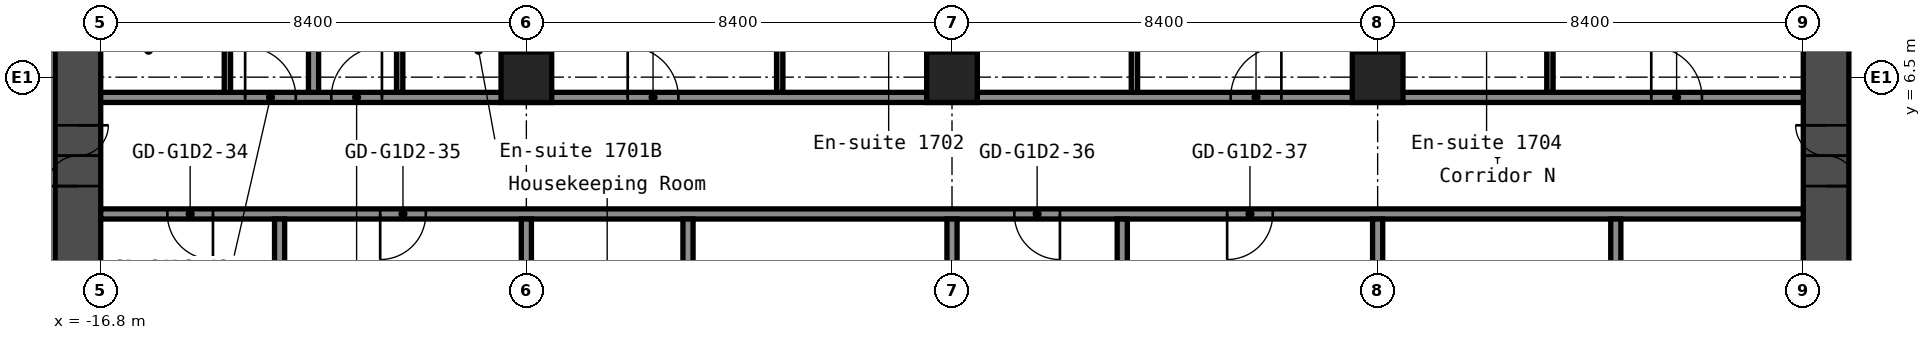
"""IFC4 building model, lengths in metres.
Left out: names, types, materials, properties, quantities, classifications, styles, units other than length and angle.
Written with IfcOpenShell. Run it as: python <this file> out.ifc"""

import sys

from ifc_helpers import new_model, si_unit, direction, frame, frame_2d, origin, origin_2d, place, context, subcontext, project, spatial, rectangle, hollow_rectangle, extrude, element, fill, save


model = new_model("IFC4")
c1 = context("Model", 3, precision=1e-05, world=origin(), true_north=direction((0.0, 1.0)))
c2 = subcontext(c1, "Body", "Model", "MODEL_VIEW")
j1 = project(units=[si_unit("LENGTHUNIT", "METRE"), si_unit("PLANEANGLEUNIT", "RADIAN")], contexts=[c1])
p1 = place(None, origin())
s1 = spatial("IfcSite", under=j1, at=p1, CompositionType="ELEMENT")
p2 = place(p1, origin())
s2 = spatial("IfcBuilding", under=s1, at=p2, CompositionType="ELEMENT")
p3 = place(p2, frame((0.0, 0.0, 61.4)))
s3 = spatial("IfcBuildingStorey", under=s2, at=p3, CompositionType="ELEMENT", Elevation=61.4)
for number, where, z_axis, x_axis in (
    (1, (-8.4, 6.5, 0.0), (0.0, 0.0, 1.0), (1.0, 0.0, 0.0)),
    (2, (0.0, 6.5, 0.0), (0.0, 0.0, 1.0), (1.0, 0.0, 0.0)),
    (3, (8.4, 6.5, 0.0), (0.0, 0.0, 1.0), (1.0, 0.0, 0.0)),
):
    element("IfcColumn", number, at=place(p3, frame(where, z_axis=z_axis, x_axis=x_axis)), inside=s3, PredefinedType="COLUMN", context=c2, shape_type="SweptSolid", body=[
        extrude(hollow_rectangle(XDim=1.0, YDim=1.0, WallThickness=0.04, at=origin_2d()), origin(), (0.0, 0.0, 1.0), 2.9),
    ])
p4 = place(p3, frame((-17.25, -8.4, 0.0), z_axis=(0.0, 0.0, 1.0), x_axis=(0.0, 1.0, 0.0)))
e4 = element("IfcWall", 4, at=p4, inside=s3, PredefinedType="SHEAR", context=c2, shape_type="SweptSolid", body=[
    extrude(rectangle(XDim=16.8, YDim=0.9, at=frame_2d((8.4, 0.0))), origin(), (0.0, 0.0, 1.0), 2.9),
])
p5 = place(p4, frame((12.75, 0.0, 0.0)))
e5 = element("IfcOpeningElement", 5, at=p5, cuts=e4, PredefinedType="OPENING", context=c2, shape_type="SweptSolid", body=[
    extrude(rectangle(XDim=1.2, YDim=2.1, at=frame_2d((0.6, 1.05))), frame((0.0, 0.46, 0.0), z_axis=(0.0, -1.0, 0.0), x_axis=(1.0, 0.0, 0.0)), (0.0, 0.0, 1.0), 0.92),
])
p6 = place(p4, frame((2.85, 0.0, 0.0)))
e6 = element("IfcOpeningElement", 6, at=p6, cuts=e4, PredefinedType="OPENING", context=c2, shape_type="SweptSolid", body=[
    extrude(rectangle(XDim=1.2, YDim=2.1, at=frame_2d((0.6, 1.05))), frame((0.0, 0.46, 0.0), z_axis=(0.0, -1.0, 0.0), x_axis=(1.0, 0.0, 0.0)), (0.0, 0.0, 1.0), 0.92),
])
p7 = place(p3, frame((17.25, -8.4, 0.0), z_axis=(0.0, 0.0, 1.0), x_axis=(0.0, 1.0, 0.0)))
e7 = element("IfcWall", 7, at=p7, inside=s3, PredefinedType="SHEAR", context=c2, shape_type="SweptSolid", body=[
    extrude(rectangle(XDim=16.8, YDim=0.9, at=frame_2d((8.4, 0.0))), origin(), (0.0, 0.0, 1.0), 2.9),
])
p8 = place(p7, frame((12.75, 0.0, 0.0)))
e8 = element("IfcOpeningElement", 8, at=p8, cuts=e7, PredefinedType="OPENING", context=c2, shape_type="SweptSolid", body=[
    extrude(rectangle(XDim=1.2, YDim=2.1, at=frame_2d((0.6, 1.05))), frame((0.0, 0.46, 0.0), z_axis=(0.0, -1.0, 0.0), x_axis=(1.0, 0.0, 0.0)), (0.0, 0.0, 1.0), 0.92),
])
p9 = place(p7, frame((2.85, 0.0, 0.0)))
e9 = element("IfcOpeningElement", 9, at=p9, cuts=e7, PredefinedType="OPENING", context=c2, shape_type="SweptSolid", body=[
    extrude(rectangle(XDim=1.2, YDim=2.1, at=frame_2d((0.6, 1.05))), frame((0.0, 0.46, 0.0), z_axis=(0.0, -1.0, 0.0), x_axis=(1.0, 0.0, 0.0)), (0.0, 0.0, 1.0), 0.92),
])
p10 = place(p3, frame((-16.8, 3.8, 0.0), z_axis=(0.0, 0.0, 1.0), x_axis=(1.0, 0.0, 0.0)))
e10 = element("IfcWall", 10, at=p10, inside=s3, PredefinedType="PARTITIONING", context=c2, shape_type="SweptSolid", body=[
    extrude(rectangle(XDim=33.6, YDim=0.2, at=frame_2d((16.8, 0.0))), origin(), (0.0, 0.0, 1.0), 2.9),
])
p11 = place(p10, frame((1.315, 0.0, 0.0)))
e11 = element("IfcOpeningElement", 11, at=p11, cuts=e10, PredefinedType="OPENING", context=c2, shape_type="SweptSolid", body=[
    extrude(rectangle(XDim=0.9, YDim=2.1, at=frame_2d((0.45, 1.05))), frame((0.0, 0.11, 0.0), z_axis=(0.0, -1.0, 0.0), x_axis=(1.0, 0.0, 0.0)), (0.0, 0.0, 1.0), 0.22),
])
p12 = place(p10, frame((5.515, 0.0, 0.0)))
e12 = element("IfcOpeningElement", 12, at=p12, cuts=e10, PredefinedType="OPENING", context=c2, shape_type="SweptSolid", body=[
    extrude(rectangle(XDim=0.9, YDim=2.1, at=frame_2d((0.45, 1.05))), frame((0.0, 0.11, 0.0), z_axis=(0.0, -1.0, 0.0), x_axis=(1.0, 0.0, 0.0)), (0.0, 0.0, 1.0), 0.22),
])
p13 = place(p10, frame((18.03, 0.0, 0.0)))
e13 = element("IfcOpeningElement", 13, at=p13, cuts=e10, PredefinedType="OPENING", context=c2, shape_type="SweptSolid", body=[
    extrude(rectangle(XDim=0.9, YDim=2.1, at=frame_2d((0.45, 1.05))), frame((0.0, 0.11, 0.0), z_axis=(0.0, -1.0, 0.0), x_axis=(1.0, 0.0, 0.0)), (0.0, 0.0, 1.0), 0.22),
])
p14 = place(p10, frame((22.23, 0.0, 0.0)))
e14 = element("IfcOpeningElement", 14, at=p14, cuts=e10, PredefinedType="OPENING", context=c2, shape_type="SweptSolid", body=[
    extrude(rectangle(XDim=0.9, YDim=2.1, at=frame_2d((0.45, 1.05))), frame((0.0, 0.11, 0.0), z_axis=(0.0, -1.0, 0.0), x_axis=(1.0, 0.0, 0.0)), (0.0, 0.0, 1.0), 0.22),
])
p15 = place(p3, frame((-16.8, 6.1, 0.0), z_axis=(0.0, 0.0, 1.0), x_axis=(1.0, 0.0, 0.0)))
e15 = element("IfcWall", 15, at=p15, inside=s3, PredefinedType="PARTITIONING", context=c2, shape_type="SweptSolid", body=[
    extrude(rectangle(XDim=33.6, YDim=0.2, at=frame_2d((16.8, 0.0))), origin(), (0.0, 0.0, 1.0), 2.9),
])
p16 = place(p15, frame((2.85, 0.0, 0.0)))
e16 = element("IfcOpeningElement", 16, at=p16, cuts=e15, PredefinedType="OPENING", context=c2, shape_type="SweptSolid", body=[
    extrude(rectangle(XDim=1.0, YDim=2.1, at=frame_2d((0.5, 1.05))), frame((0.0, 0.11, 0.0), z_axis=(0.0, -1.0, 0.0), x_axis=(1.0, 0.0, 0.0)), (0.0, 0.0, 1.0), 0.22),
])
p17 = place(p15, frame((4.55, 0.0, 0.0)))
e17 = element("IfcOpeningElement", 17, at=p17, cuts=e15, PredefinedType="OPENING", context=c2, shape_type="SweptSolid", body=[
    extrude(rectangle(XDim=1.0, YDim=2.1, at=frame_2d((0.5, 1.05))), frame((0.0, 0.11, 0.0), z_axis=(0.0, -1.0, 0.0), x_axis=(1.0, 0.0, 0.0)), (0.0, 0.0, 1.0), 0.22),
])
p18 = place(p15, frame((10.4, 0.0, 0.0)))
e18 = element("IfcOpeningElement", 18, at=p18, cuts=e15, PredefinedType="OPENING", context=c2, shape_type="SweptSolid", body=[
    extrude(rectangle(XDim=1.0, YDim=2.1, at=frame_2d((0.5, 1.05))), frame((0.0, 0.11, 0.0), z_axis=(0.0, -1.0, 0.0), x_axis=(1.0, 0.0, 0.0)), (0.0, 0.0, 1.0), 0.22),
])
p19 = place(p15, frame((22.3, 0.0, 0.0)))
e19 = element("IfcOpeningElement", 19, at=p19, cuts=e15, PredefinedType="OPENING", context=c2, shape_type="SweptSolid", body=[
    extrude(rectangle(XDim=1.0, YDim=2.1, at=frame_2d((0.5, 1.05))), frame((0.0, 0.11, 0.0), z_axis=(0.0, -1.0, 0.0), x_axis=(1.0, 0.0, 0.0)), (0.0, 0.0, 1.0), 0.22),
])
p20 = place(p15, frame((30.6, 0.0, 0.0)))
e20 = element("IfcOpeningElement", 20, at=p20, cuts=e15, PredefinedType="OPENING", context=c2, shape_type="SweptSolid", body=[
    extrude(rectangle(XDim=1.0, YDim=2.1, at=frame_2d((0.5, 1.05))), frame((0.0, 0.11, 0.0), z_axis=(0.0, -1.0, 0.0), x_axis=(1.0, 0.0, 0.0)), (0.0, 0.0, 1.0), 0.22),
])
p21 = place(p3, frame((-14.3, 6.2, 0.0), z_axis=(0.0, 0.0, 1.0), x_axis=(0.0, 1.0, 0.0)))
e21 = element("IfcWall", 21, at=p21, inside=s3, PredefinedType="PARTITIONING", context=c2, shape_type="SweptSolid", body=[
    extrude(rectangle(XDim=2.9, YDim=0.125, at=frame_2d((1.45, 0.0))), origin(), (0.0, 0.0, 1.0), 2.9),
])
p22 = place(p21, frame((1.5, 0.0, 0.0)))
e22 = element("IfcOpeningElement", 22, at=p22, cuts=e21, PredefinedType="OPENING", context=c2, shape_type="SweptSolid", body=[
    extrude(rectangle(XDim=0.8, YDim=2.1, at=frame_2d((0.4, 1.05))), frame((0.0, 0.073, 0.0), z_axis=(0.0, -1.0, 0.0), x_axis=(1.0, 0.0, 0.0)), (0.0, 0.0, 1.0), 0.145),
])
p23 = place(p3, frame((-13.27, -3.7, 0.0), z_axis=(0.0, 0.0, 1.0), x_axis=(0.0, 1.0, 0.0)))
e23 = element("IfcWall", 23, at=p23, inside=s3, PredefinedType="PARTITIONING", context=c2, shape_type="SweptSolid", body=[
    extrude(rectangle(XDim=7.4, YDim=0.2, at=frame_2d((3.7, 0.0))), origin(), (0.0, 0.0, 1.0), 2.9),
])
p24 = place(p3, frame((-12.6, 6.2, 0.0), z_axis=(0.0, 0.0, 1.0), x_axis=(0.0, 1.0, 0.0)))
e24 = element("IfcWall", 24, at=p24, inside=s3, PredefinedType="PARTITIONING", context=c2, shape_type="SweptSolid", body=[
    extrude(rectangle(XDim=14.1, YDim=0.2, at=frame_2d((7.05, 0.0))), origin(), (0.0, 0.0, 1.0), 2.9),
])
p25 = place(p3, frame((-10.9, 6.2, 0.0), z_axis=(0.0, 0.0, 1.0), x_axis=(0.0, 1.0, 0.0)))
e25 = element("IfcWall", 25, at=p25, inside=s3, PredefinedType="PARTITIONING", context=c2, shape_type="SweptSolid", body=[
    extrude(rectangle(XDim=2.9, YDim=0.125, at=frame_2d((1.45, 0.0))), origin(), (0.0, 0.0, 1.0), 2.9),
])
p26 = place(p25, frame((1.5, 0.0, 0.0)))
e26 = element("IfcOpeningElement", 26, at=p26, cuts=e25, PredefinedType="OPENING", context=c2, shape_type="SweptSolid", body=[
    extrude(rectangle(XDim=0.8, YDim=2.1, at=frame_2d((0.4, 1.05))), frame((0.0, 0.073, 0.0), z_axis=(0.0, -1.0, 0.0), x_axis=(1.0, 0.0, 0.0)), (0.0, 0.0, 1.0), 0.145),
])
p27 = place(p3, frame((-8.4, -3.7, 0.0), z_axis=(0.0, 0.0, 1.0), x_axis=(0.0, 1.0, 0.0)))
e27 = element("IfcWall", 27, at=p27, inside=s3, PredefinedType="PARTITIONING", context=c2, shape_type="SweptSolid", body=[
    extrude(rectangle(XDim=7.4, YDim=0.2, at=frame_2d((3.7, 0.0))), origin(), (0.0, 0.0, 1.0), 2.9),
])
p28 = place(p3, frame((-8.4, 6.99, 0.0), z_axis=(0.0, 0.0, 1.0), x_axis=(0.0, 1.0, 0.0)))
e28 = element("IfcWall", 28, at=p28, inside=s3, PredefinedType="PARTITIONING", context=c2, shape_type="SweptSolid", body=[
    extrude(rectangle(XDim=13.31, YDim=0.2, at=frame_2d((6.655, 0.0))), origin(), (0.0, 0.0, 1.0), 2.9),
])
p29 = place(p3, frame((-5.21, -3.7, 0.0), z_axis=(0.0, 0.0, 1.0), x_axis=(0.0, 1.0, 0.0)))
e29 = element("IfcWall", 29, at=p29, inside=s3, PredefinedType="PARTITIONING", context=c2, shape_type="SweptSolid", body=[
    extrude(rectangle(XDim=7.4, YDim=0.2, at=frame_2d((3.7, 0.0))), origin(), (0.0, 0.0, 1.0), 2.9),
])
p30 = place(p3, frame((-3.4, 6.2, 0.0), z_axis=(0.0, 0.0, 1.0), x_axis=(0.0, 1.0, 0.0)))
e30 = element("IfcWall", 30, at=p30, inside=s3, PredefinedType="PARTITIONING", context=c2, shape_type="SweptSolid", body=[
    extrude(rectangle(XDim=3.3, YDim=0.125, at=frame_2d((1.65, 0.0))), origin(), (0.0, 0.0, 1.0), 2.9),
])
p31 = place(p3, frame((0.0, -3.7, 0.0), z_axis=(0.0, 0.0, 1.0), x_axis=(0.0, 1.0, 0.0)))
e31 = element("IfcWall", 31, at=p31, inside=s3, PredefinedType="PARTITIONING", context=c2, shape_type="SweptSolid", body=[
    extrude(rectangle(XDim=7.4, YDim=0.2, at=frame_2d((3.7, 0.0))), origin(), (0.0, 0.0, 1.0), 2.9),
])
p32 = place(p3, frame((0.0, 6.99, 0.0), z_axis=(0.0, 0.0, 1.0), x_axis=(0.0, 1.0, 0.0)))
e32 = element("IfcWall", 32, at=p32, inside=s3, PredefinedType="PARTITIONING", context=c2, shape_type="SweptSolid", body=[
    extrude(rectangle(XDim=13.31, YDim=0.2, at=frame_2d((6.655, 0.0))), origin(), (0.0, 0.0, 1.0), 2.9),
])
p33 = place(p3, frame((3.36, -3.7, 0.0), z_axis=(0.0, 0.0, 1.0), x_axis=(0.0, 1.0, 0.0)))
e33 = element("IfcWall", 33, at=p33, inside=s3, PredefinedType="PARTITIONING", context=c2, shape_type="SweptSolid", body=[
    extrude(rectangle(XDim=7.4, YDim=0.2, at=frame_2d((3.7, 0.0))), origin(), (0.0, 0.0, 1.0), 2.9),
])
p34 = place(p3, frame((3.6, 6.2, 0.0), z_axis=(0.0, 0.0, 1.0), x_axis=(0.0, 1.0, 0.0)))
e34 = element("IfcWall", 34, at=p34, inside=s3, PredefinedType="PARTITIONING", context=c2, shape_type="SweptSolid", body=[
    extrude(rectangle(XDim=3.3, YDim=0.125, at=frame_2d((1.65, 0.0))), origin(), (0.0, 0.0, 1.0), 2.9),
])
p35 = place(p34, frame((1.1, 0.0, 0.0)))
e35 = element("IfcOpeningElement", 35, at=p35, cuts=e34, PredefinedType="OPENING", context=c2, shape_type="SweptSolid", body=[
    extrude(rectangle(XDim=1.0, YDim=2.1, at=frame_2d((0.5, 1.05))), frame((0.0, 0.073, 0.0), z_axis=(0.0, -1.0, 0.0), x_axis=(1.0, 0.0, 0.0)), (0.0, 0.0, 1.0), 0.145),
])
p36 = place(p3, frame((8.4, -3.7, 0.0), z_axis=(0.0, 0.0, 1.0), x_axis=(0.0, 1.0, 0.0)))
e36 = element("IfcWall", 36, at=p36, inside=s3, PredefinedType="PARTITIONING", context=c2, shape_type="SweptSolid", body=[
    extrude(rectangle(XDim=7.4, YDim=0.2, at=frame_2d((3.7, 0.0))), origin(), (0.0, 0.0, 1.0), 2.9),
])
p37 = place(p3, frame((8.4, 6.99, 0.0), z_axis=(0.0, 0.0, 1.0), x_axis=(0.0, 1.0, 0.0)))
e37 = element("IfcWall", 37, at=p37, inside=s3, PredefinedType="PARTITIONING", context=c2, shape_type="SweptSolid", body=[
    extrude(rectangle(XDim=13.31, YDim=0.2, at=frame_2d((6.655, 0.0))), origin(), (0.0, 0.0, 1.0), 2.9),
])
p38 = place(p3, frame((11.8, 6.2, 0.0), z_axis=(0.0, 0.0, 1.0), x_axis=(0.0, 1.0, 0.0)))
e38 = element("IfcWall", 38, at=p38, inside=s3, PredefinedType="PARTITIONING", context=c2, shape_type="SweptSolid", body=[
    extrude(rectangle(XDim=3.3, YDim=0.125, at=frame_2d((1.65, 0.0))), origin(), (0.0, 0.0, 1.0), 2.9),
])
p39 = place(p3, frame((13.1, -3.7, 0.0), z_axis=(0.0, 0.0, 1.0), x_axis=(0.0, 1.0, 0.0)))
e39 = element("IfcWall", 39, at=p39, inside=s3, PredefinedType="PARTITIONING", context=c2, shape_type="SweptSolid", body=[
    extrude(rectangle(XDim=7.4, YDim=0.2, at=frame_2d((3.7, 0.0))), origin(), (0.0, 0.0, 1.0), 2.9),
])
p40 = place(p5, origin())
e40 = element("IfcDoor", 40, at=p40, inside=s3, OperationType="DOUBLE_DOOR_SINGLE_SWING", PredefinedType="DOOR", context=c2, shape_type="SweptSolid", body=[
    extrude(rectangle(XDim=1.2, YDim=2.1, at=frame_2d((0.6, 1.05))), frame((0.0, 0.025, 0.0), z_axis=(0.0, -1.0, 0.0), x_axis=(1.0, 0.0, 0.0)), (0.0, 0.0, 1.0), 0.05),
])
fill(e5, e40)
p41 = place(p8, origin())
e41 = element("IfcDoor", 41, at=p41, inside=s3, OperationType="DOUBLE_DOOR_SINGLE_SWING", PredefinedType="DOOR", context=c2, shape_type="SweptSolid", body=[
    extrude(rectangle(XDim=1.2, YDim=2.1, at=frame_2d((0.6, 1.05))), frame((0.0, 0.025, 0.0), z_axis=(0.0, -1.0, 0.0), x_axis=(1.0, 0.0, 0.0)), (0.0, 0.0, 1.0), 0.05),
])
fill(e8, e41)
p42 = place(p11, origin())
e42 = element("IfcDoor", 42, at=p42, inside=s3, OperationType="SINGLE_SWING_RIGHT", PredefinedType="DOOR", context=c2, shape_type="SweptSolid", body=[
    extrude(rectangle(XDim=0.9, YDim=2.1, at=frame_2d((0.45, 1.05))), frame((0.0, 0.025, 0.0), z_axis=(0.0, -1.0, 0.0), x_axis=(1.0, 0.0, 0.0)), (0.0, 0.0, 1.0), 0.05),
])
fill(e11, e42)
p43 = place(p12, origin())
e43 = element("IfcDoor", 43, at=p43, inside=s3, OperationType="SINGLE_SWING_LEFT", PredefinedType="DOOR", context=c2, shape_type="SweptSolid", body=[
    extrude(rectangle(XDim=0.9, YDim=2.1, at=frame_2d((0.45, 1.05))), frame((0.0, 0.025, 0.0), z_axis=(0.0, -1.0, 0.0), x_axis=(1.0, 0.0, 0.0)), (0.0, 0.0, 1.0), 0.05),
])
fill(e12, e43)
p44 = place(p13, origin())
e44 = element("IfcDoor", 44, at=p44, inside=s3, OperationType="SINGLE_SWING_RIGHT", PredefinedType="DOOR", context=c2, shape_type="SweptSolid", body=[
    extrude(rectangle(XDim=0.9, YDim=2.1, at=frame_2d((0.45, 1.05))), frame((0.0, 0.025, 0.0), z_axis=(0.0, -1.0, 0.0), x_axis=(1.0, 0.0, 0.0)), (0.0, 0.0, 1.0), 0.05),
])
fill(e13, e44)
p45 = place(p14, origin())
e45 = element("IfcDoor", 45, at=p45, inside=s3, OperationType="SINGLE_SWING_LEFT", PredefinedType="DOOR", context=c2, shape_type="SweptSolid", body=[
    extrude(rectangle(XDim=0.9, YDim=2.1, at=frame_2d((0.45, 1.05))), frame((0.0, 0.025, 0.0), z_axis=(0.0, -1.0, 0.0), x_axis=(1.0, 0.0, 0.0)), (0.0, 0.0, 1.0), 0.05),
])
fill(e14, e45)
p46 = place(p16, origin())
e46 = element("IfcDoor", 46, at=p46, inside=s3, OperationType="SINGLE_SWING_RIGHT", PredefinedType="DOOR", context=c2, shape_type="SweptSolid", body=[
    extrude(rectangle(XDim=1.0, YDim=2.1, at=frame_2d((0.5, 1.05))), frame((0.0, 0.025, 0.0), z_axis=(0.0, -1.0, 0.0), x_axis=(1.0, 0.0, 0.0)), (0.0, 0.0, 1.0), 0.05),
])
fill(e16, e46)
p47 = place(p17, origin())
e47 = element("IfcDoor", 47, at=p47, inside=s3, OperationType="SINGLE_SWING_LEFT", PredefinedType="DOOR", context=c2, shape_type="SweptSolid", body=[
    extrude(rectangle(XDim=1.0, YDim=2.1, at=frame_2d((0.5, 1.05))), frame((0.0, 0.025, 0.0), z_axis=(0.0, -1.0, 0.0), x_axis=(1.0, 0.0, 0.0)), (0.0, 0.0, 1.0), 0.05),
])
fill(e17, e47)
p48 = place(p18, origin())
e48 = element("IfcDoor", 48, at=p48, inside=s3, OperationType="SINGLE_SWING_RIGHT", PredefinedType="DOOR", context=c2, shape_type="SweptSolid", body=[
    extrude(rectangle(XDim=1.0, YDim=2.1, at=frame_2d((0.5, 1.05))), frame((0.0, 0.025, 0.0), z_axis=(0.0, -1.0, 0.0), x_axis=(1.0, 0.0, 0.0)), (0.0, 0.0, 1.0), 0.05),
])
fill(e18, e48)
p49 = place(p19, origin())
e49 = element("IfcDoor", 49, at=p49, inside=s3, OperationType="SINGLE_SWING_LEFT", PredefinedType="DOOR", context=c2, shape_type="SweptSolid", body=[
    extrude(rectangle(XDim=1.0, YDim=2.1, at=frame_2d((0.5, 1.05))), frame((0.0, 0.025, 0.0), z_axis=(0.0, -1.0, 0.0), x_axis=(1.0, 0.0, 0.0)), (0.0, 0.0, 1.0), 0.05),
])
fill(e19, e49)
p50 = place(p20, origin())
e50 = element("IfcDoor", 50, at=p50, inside=s3, OperationType="SINGLE_SWING_RIGHT", PredefinedType="DOOR", context=c2, shape_type="SweptSolid", body=[
    extrude(rectangle(XDim=1.0, YDim=2.1, at=frame_2d((0.5, 1.05))), frame((0.0, 0.025, 0.0), z_axis=(0.0, -1.0, 0.0), x_axis=(1.0, 0.0, 0.0)), (0.0, 0.0, 1.0), 0.05),
])
fill(e20, e50)
save(model, sys.argv[1])
